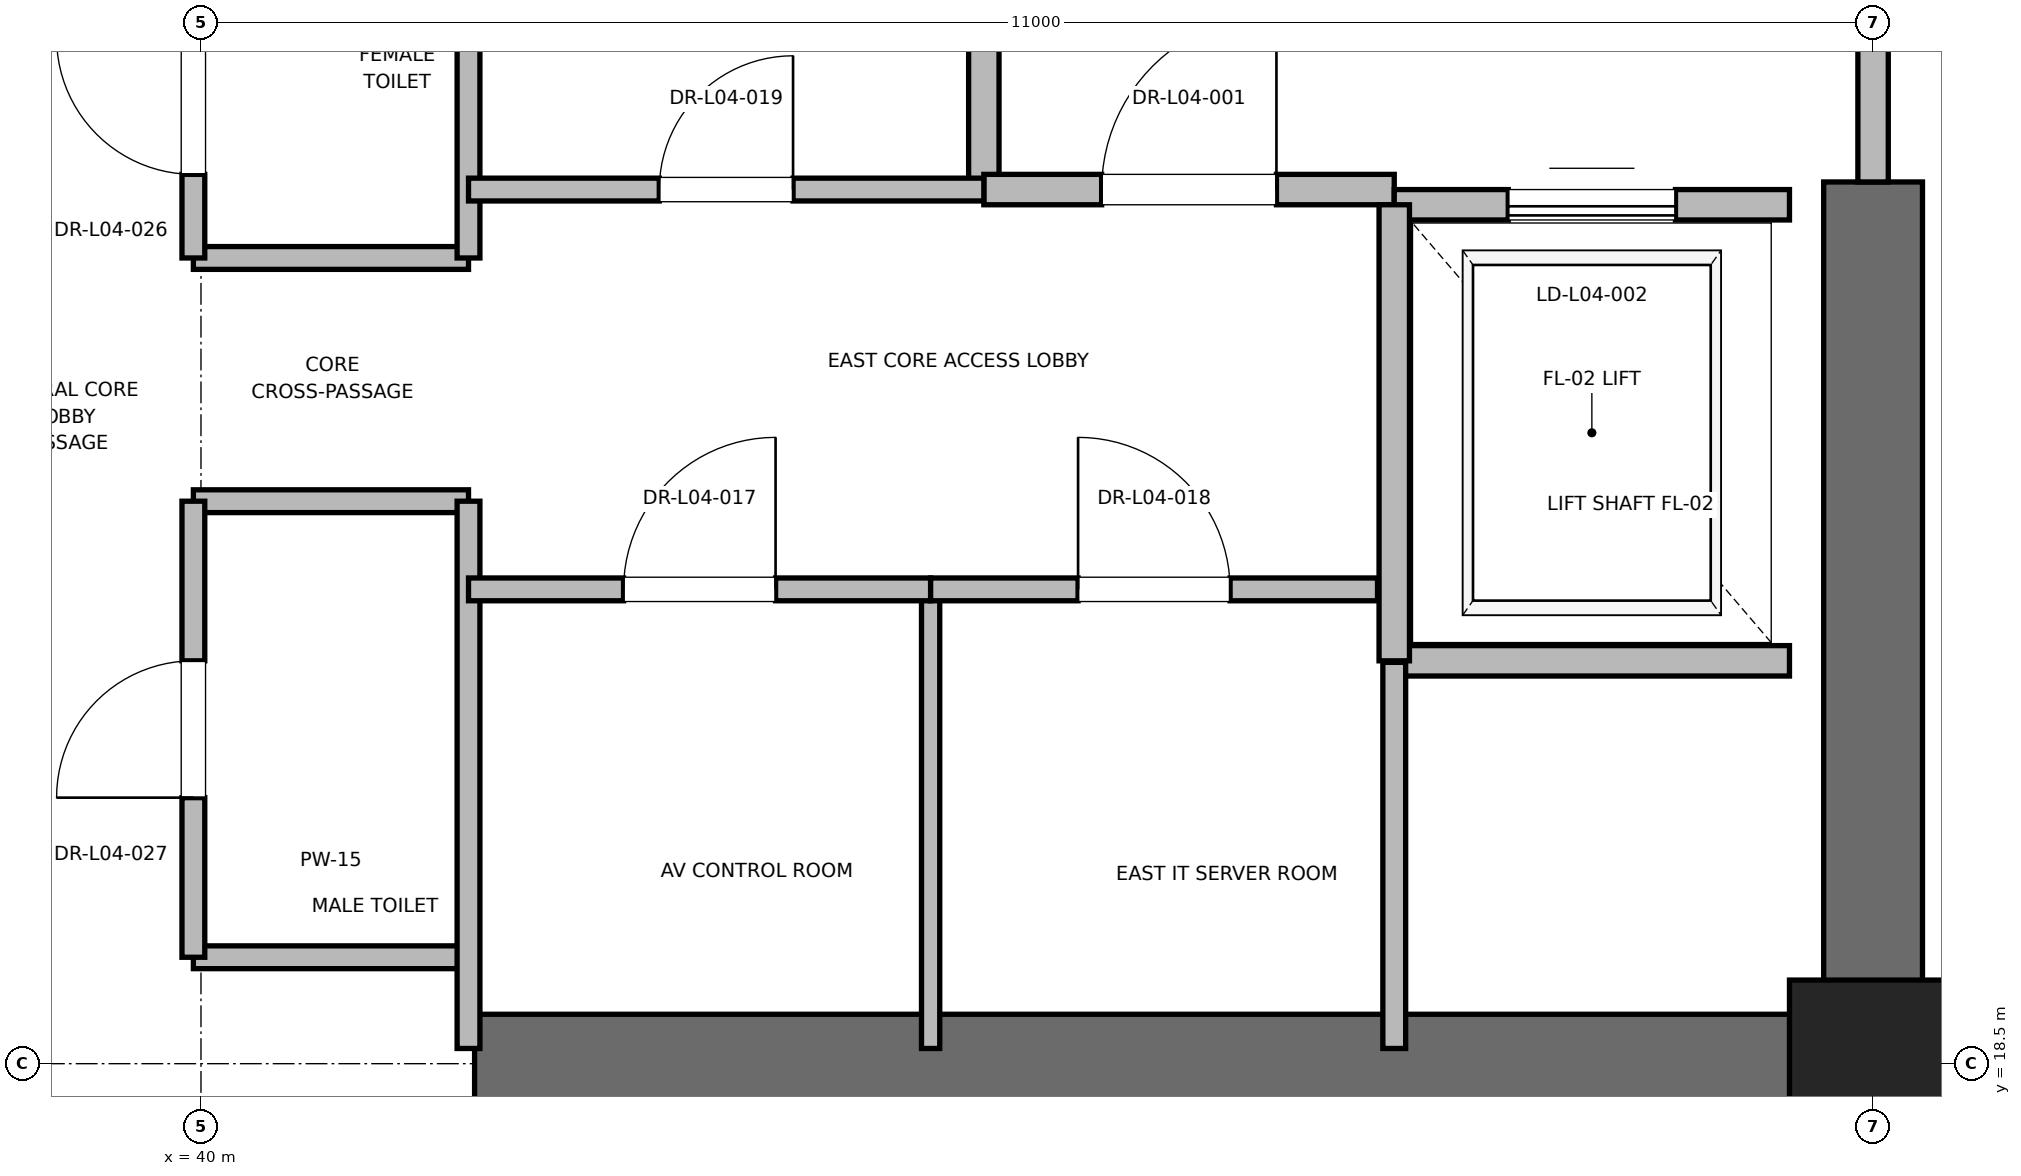
"""IFC4 building model, lengths in metres.
Left out: names, types, materials, properties, quantities, classifications, styles, units other than length and angle.
Written with IfcOpenShell. Run it as: python <this file> out.ifc"""

import sys

from ifc_helpers import new_model, si_unit, direction, frame, frame_2d, origin, origin_2d, place, context, subcontext, project, spatial, rectangle, extrude, element, fill, save


model = new_model("IFC4")
c1 = context("Model", 3, precision=1e-05, world=origin(), true_north=direction((0.0, 1.0)))
c2 = subcontext(c1, "Body", "Model", "MODEL_VIEW")
j1 = project(units=[si_unit("LENGTHUNIT", "METRE"), si_unit("PLANEANGLEUNIT", "RADIAN")], contexts=[c1])
p1 = place(None, origin())
s1 = spatial("IfcSite", under=j1, at=p1, CompositionType="ELEMENT")
p2 = place(p1, origin())
s2 = spatial("IfcBuilding", under=s1, at=p2, CompositionType="ELEMENT")
p3 = place(p2, frame((0.0, 0.0, 21.6)))
s3 = spatial("IfcBuildingStorey", under=s2, at=p3, CompositionType="ELEMENT", Elevation=21.6)
p4 = place(p3, frame((51.0, 18.5, 0.0), z_axis=(0.0, 0.0, 1.0), x_axis=(1.0, 0.0, 0.0)))
e1 = element("IfcColumn", 1, at=p4, inside=s3, PredefinedType="PILASTER", context=c2, shape_type="SweptSolid", body=[
    extrude(rectangle(XDim=1.1, YDim=1.1, at=origin_2d()), origin(), (0.0, 0.0, 1.0), 6.0),
])
p5 = place(p3, frame((41.8, 18.5, 0.0), z_axis=(0.0, 0.0, 1.0), x_axis=(1.0, 0.0, 0.0)))
e2 = element("IfcWall", 2, at=p5, inside=s3, PredefinedType="SHEAR", context=c2, shape_type="SweptSolid", body=[
    extrude(rectangle(XDim=9.2, YDim=0.65, at=frame_2d((4.6, 0.0))), origin(), (0.0, 0.0, 1.0), 5.76),
])
p6 = place(p3, frame((51.0, 18.5, 0.0), z_axis=(0.0, 0.0, 1.0), x_axis=(0.0, 1.0, 0.0)))
e3 = element("IfcWall", 3, at=p6, inside=s3, PredefinedType="SHEAR", context=c2, shape_type="SweptSolid", body=[
    extrude(rectangle(XDim=5.8, YDim=0.65, at=frame_2d((2.9, 0.0))), origin(), (0.0, 0.0, 1.0), 5.76),
])
p7 = place(p3, frame((45.15, 24.25, 0.0), z_axis=(0.0, 0.0, 1.0), x_axis=(0.0, 1.0, 0.0)))
e4 = element("IfcWall", 4, at=p7, inside=s3, PredefinedType="PARTITIONING", context=c2, shape_type="SweptSolid", body=[
    extrude(rectangle(XDim=3.37, YDim=0.2, at=frame_2d((1.685, 0.0))), origin(), (0.0, 0.0, 1.0), 5.76),
])
p8 = place(p3, frame((45.15, 24.25, 0.0), z_axis=(0.0, 0.0, 1.0), x_axis=(1.0, 0.0, 0.0)))
e5 = element("IfcWall", 5, at=p8, inside=s3, PredefinedType="PARTITIONING", context=c2, shape_type="SweptSolid", body=[
    extrude(rectangle(XDim=2.7, YDim=0.2, at=frame_2d((1.35, 0.0))), origin(), (0.0, 0.0, 1.0), 5.76),
])
p9 = place(p8, frame((0.775, 0.0, 0.0)))
e6 = element("IfcOpeningElement", 6, at=p9, cuts=e5, PredefinedType="OPENING", context=c2, shape_type="SweptSolid", body=[
    extrude(rectangle(XDim=1.15, YDim=2.2, at=frame_2d((0.575, 1.1))), frame((0.0, 0.1, 0.0), z_axis=(0.0, -1.0, 0.0), x_axis=(1.0, 0.0, 0.0)), (0.0, 0.0, 1.0), 0.2),
])
p10 = place(p3, frame((51.0, 24.3, 0.0), z_axis=(0.0, 0.0, 1.0), x_axis=(0.0, 1.0, 0.0)))
e7 = element("IfcWall", 7, at=p10, inside=s3, PredefinedType="PARTITIONING", context=c2, shape_type="SweptSolid", body=[
    extrude(rectangle(XDim=3.4, YDim=0.2, at=frame_2d((1.7, 0.0))), origin(), (0.0, 0.0, 1.0), 4.54),
])
p11 = place(p10, frame((1.125, 0.0, 0.0)))
e8 = element("IfcOpeningElement", 8, at=p11, cuts=e7, PredefinedType="OPENING", context=c2, shape_type="SweptSolid", body=[
    extrude(rectangle(XDim=1.15, YDim=2.2, at=frame_2d((0.575, 1.1))), frame((0.0, 0.1, 0.0), z_axis=(0.0, -1.0, 0.0), x_axis=(1.0, 0.0, 0.0)), (0.0, 0.0, 1.0), 0.2),
])
p12 = place(p3, frame((47.85, 21.15, 0.0), z_axis=(0.0, 0.0, 1.0), x_axis=(1.0, 0.0, 0.0)))
e9 = element("IfcWall", 9, at=p12, inside=s3, PredefinedType="SOLIDWALL", context=c2, shape_type="SweptSolid", body=[
    extrude(rectangle(XDim=2.6, YDim=0.2, at=frame_2d((1.3, 0.0))), origin(), (0.0, 0.0, 1.0), 5.76),
])
p13 = place(p3, frame((50.45, 24.15, 0.0), z_axis=(0.0, 0.0, 1.0), x_axis=(-1.0, 0.0, 0.0)))
e10 = element("IfcWall", 10, at=p13, inside=s3, PredefinedType="SOLIDWALL", context=c2, shape_type="SweptSolid", body=[
    extrude(rectangle(XDim=2.6, YDim=0.2, at=frame_2d((1.3, 0.0))), origin(), (0.0, 0.0, 1.0), 4.54),
])
p14 = place(p13, frame((0.75, 0.0, 0.0)))
e11 = element("IfcOpeningElement", 11, at=p14, cuts=e10, PredefinedType="OPENING", context=c2, shape_type="SweptSolid", body=[
    extrude(rectangle(XDim=1.1, YDim=2.2, at=frame_2d((0.55, 1.1))), frame((0.0, 0.1, 0.0), z_axis=(0.0, -1.0, 0.0), x_axis=(1.0, 0.0, 0.0)), (0.0, 0.0, 1.0), 0.2),
])
p15 = place(p3, frame((47.85, 24.15, 0.0), z_axis=(0.0, 0.0, 1.0), x_axis=(0.0, -1.0, 0.0)))
e12 = element("IfcWall", 12, at=p15, inside=s3, PredefinedType="SOLIDWALL", context=c2, shape_type="SweptSolid", body=[
    extrude(rectangle(XDim=3.0, YDim=0.2, at=frame_2d((1.5, 0.0))), origin(), (0.0, 0.0, 1.0), 5.76),
])
for number, where, z_axis, x_axis in (
    (13, (39.95, 19.2, 0.0), (0.0, 0.0, 1.0), (1.0, 0.0, 0.0)),
    (14, (39.95, 22.2, 0.0), (0.0, 0.0, 1.0), (1.0, 0.0, 0.0)),
    (15, (39.95, 23.8, 0.0), (0.0, 0.0, 1.0), (1.0, 0.0, 0.0)),
):
    element("IfcWall", number, at=place(p3, frame(where, z_axis=z_axis, x_axis=x_axis)), inside=s3, PredefinedType="PARTITIONING", context=c2, shape_type="SweptSolid", body=[
        extrude(rectangle(XDim=1.81, YDim=0.15, at=frame_2d((0.905, 0.0))), origin(), (0.0, 0.0, 1.0), 2.85),
    ])
p16 = place(p3, frame((41.76, 18.6, 0.0), z_axis=(0.0, 0.0, 1.0), x_axis=(0.0, 1.0, 0.0)))
e16 = element("IfcWall", 16, at=p16, inside=s3, PredefinedType="PARTITIONING", context=c2, shape_type="SweptSolid", body=[
    extrude(rectangle(XDim=3.6, YDim=0.15, at=frame_2d((1.8, 0.0))), origin(), (0.0, 0.0, 1.0), 2.85),
])
p17 = place(p3, frame((41.76, 23.8, 0.0), z_axis=(0.0, 0.0, 1.0), x_axis=(0.0, 1.0, 0.0)))
e17 = element("IfcWall", 17, at=p17, inside=s3, PredefinedType="PARTITIONING", context=c2, shape_type="SweptSolid", body=[
    extrude(rectangle(XDim=4.0, YDim=0.15, at=frame_2d((2.0, 0.0))), origin(), (0.0, 0.0, 1.0), 2.85),
])
p18 = place(p3, frame((39.95, 19.2, 0.0), z_axis=(0.0, 0.0, 1.0), x_axis=(0.0, 1.0, 0.0)))
e18 = element("IfcWall", 18, at=p18, inside=s3, PredefinedType="PARTITIONING", context=c2, shape_type="SweptSolid", body=[
    extrude(rectangle(XDim=3.0, YDim=0.15, at=frame_2d((1.5, 0.0))), origin(), (0.0, 0.0, 1.0), 2.85),
])
p19 = place(p18, frame((1.05, 0.0, 0.0)))
e19 = element("IfcOpeningElement", 19, at=p19, cuts=e18, PredefinedType="OPENING", context=c2, shape_type="SweptSolid", body=[
    extrude(rectangle(XDim=0.9, YDim=2.1, at=frame_2d((0.45, 1.05))), frame((0.0, 0.075, 0.0), z_axis=(0.0, -1.0, 0.0), x_axis=(1.0, 0.0, 0.0)), (0.0, 0.0, 1.0), 0.15),
])
p20 = place(p3, frame((39.95, 23.8, 0.0), z_axis=(0.0, 0.0, 1.0), x_axis=(0.0, 1.0, 0.0)))
e20 = element("IfcWall", 20, at=p20, inside=s3, PredefinedType="PARTITIONING", context=c2, shape_type="SweptSolid", body=[
    extrude(rectangle(XDim=2.0, YDim=0.15, at=frame_2d((1.0, 0.0))), origin(), (0.0, 0.0, 1.0), 2.85),
])
p21 = place(p20, frame((0.55, 0.0, 0.0)))
e21 = element("IfcOpeningElement", 21, at=p21, cuts=e20, PredefinedType="OPENING", context=c2, shape_type="SweptSolid", body=[
    extrude(rectangle(XDim=0.9, YDim=2.1, at=frame_2d((0.45, 1.05))), frame((0.0, 0.075, 0.0), z_axis=(0.0, -1.0, 0.0), x_axis=(1.0, 0.0, 0.0)), (0.0, 0.0, 1.0), 0.15),
])
p22 = place(p3, frame((47.85, 18.6, 0.0), z_axis=(0.0, 0.0, 1.0), x_axis=(0.0, 1.0, 0.0)))
e22 = element("IfcWall", 22, at=p22, inside=s3, PredefinedType="PARTITIONING", context=c2, shape_type="SweptSolid", body=[
    extrude(rectangle(XDim=2.54, YDim=0.15, at=frame_2d((1.27, 0.0))), origin(), (0.0, 0.0, 1.0), 2.85),
])
p23 = place(p3, frame((44.8, 18.6, 0.0), z_axis=(0.0, 0.0, 1.0), x_axis=(0.0, 1.0, 0.0)))
e23 = element("IfcWall", 23, at=p23, inside=s3, PredefinedType="PARTITIONING", context=c2, shape_type="SweptSolid", body=[
    extrude(rectangle(XDim=3.02, YDim=0.12, at=frame_2d((1.51, 0.0))), origin(), (0.0, 0.0, 1.0), 2.85),
])
p24 = place(p3, frame((41.76, 21.62, 0.0), z_axis=(0.0, 0.0, 1.0), x_axis=(1.0, 0.0, 0.0)))
e24 = element("IfcWall", 24, at=p24, inside=s3, PredefinedType="PARTITIONING", context=c2, shape_type="SweptSolid", body=[
    extrude(rectangle(XDim=3.04, YDim=0.15, at=frame_2d((1.52, 0.0))), origin(), (0.0, 0.0, 1.0), 2.85),
])
p25 = place(p24, frame((1.02, 0.0, 0.0)))
e25 = element("IfcOpeningElement", 25, at=p25, cuts=e24, PredefinedType="OPENING", context=c2, shape_type="SweptSolid", body=[
    extrude(rectangle(XDim=1.0, YDim=2.15, at=frame_2d((0.5, 1.075))), frame((0.0, 0.075, 0.0), z_axis=(0.0, -1.0, 0.0), x_axis=(1.0, 0.0, 0.0)), (0.0, 0.0, 1.0), 0.15),
])
p26 = place(p3, frame((44.8, 21.62, 0.0), z_axis=(0.0, 0.0, 1.0), x_axis=(1.0, 0.0, 0.0)))
e26 = element("IfcWall", 26, at=p26, inside=s3, PredefinedType="PARTITIONING", context=c2, shape_type="SweptSolid", body=[
    extrude(rectangle(XDim=2.94, YDim=0.15, at=frame_2d((1.47, 0.0))), origin(), (0.0, 0.0, 1.0), 2.85),
])
p27 = place(p26, frame((0.97, 0.0, 0.0)))
e27 = element("IfcOpeningElement", 27, at=p27, cuts=e26, PredefinedType="OPENING", context=c2, shape_type="SweptSolid", body=[
    extrude(rectangle(XDim=1.0, YDim=2.15, at=frame_2d((0.5, 1.075))), frame((0.0, 0.075, 0.0), z_axis=(0.0, -1.0, 0.0), x_axis=(1.0, 0.0, 0.0)), (0.0, 0.0, 1.0), 0.15),
])
p28 = place(p3, frame((41.76, 24.25, 0.0), z_axis=(0.0, 0.0, 1.0), x_axis=(1.0, 0.0, 0.0)))
e28 = element("IfcWall", 28, at=p28, inside=s3, PredefinedType="PARTITIONING", context=c2, shape_type="SweptSolid", body=[
    extrude(rectangle(XDim=3.39, YDim=0.15, at=frame_2d((1.695, 0.0))), origin(), (0.0, 0.0, 1.0), 2.85),
])
p29 = place(p28, frame((1.255, 0.0, 0.0)))
e29 = element("IfcOpeningElement", 29, at=p29, cuts=e28, PredefinedType="OPENING", context=c2, shape_type="SweptSolid", body=[
    extrude(rectangle(XDim=0.88, YDim=2.1, at=frame_2d((0.44, 1.05))), frame((0.0, 0.075, 0.0), z_axis=(0.0, -1.0, 0.0), x_axis=(1.0, 0.0, 0.0)), (0.0, 0.0, 1.0), 0.15),
])
p30 = place(p9, origin())
e30 = element("IfcDoor", 30, at=p30, inside=s3, OperationType="SINGLE_SWING_RIGHT", PredefinedType="DOOR", context=c2, shape_type="SweptSolid", body=[
    extrude(rectangle(XDim=1.15, YDim=2.2, at=frame_2d((0.575, 1.1))), frame((0.0, 0.025, 0.0), z_axis=(0.0, -1.0, 0.0), x_axis=(1.0, 0.0, 0.0)), (0.0, 0.0, 1.0), 0.05),
])
fill(e6, e30)
p31 = place(p14, origin())
e31 = element("IfcDoor", 31, at=p31, inside=s3, OperationType="SLIDING_TO_RIGHT", PredefinedType="DOOR", context=c2, shape_type="SweptSolid", body=[
    extrude(rectangle(XDim=1.1, YDim=2.2, at=frame_2d((0.55, 1.1))), frame((0.0, 0.025, 0.0), z_axis=(0.0, -1.0, 0.0), x_axis=(1.0, 0.0, 0.0)), (0.0, 0.0, 1.0), 0.05),
])
fill(e11, e31)
p32 = place(p19, origin())
e32 = element("IfcDoor", 32, at=p32, inside=s3, OperationType="SINGLE_SWING_LEFT", PredefinedType="DOOR", context=c2, shape_type="SweptSolid", body=[
    extrude(rectangle(XDim=0.9, YDim=2.1, at=frame_2d((0.45, 1.05))), frame((0.0, 0.025, 0.0), z_axis=(0.0, -1.0, 0.0), x_axis=(1.0, 0.0, 0.0)), (0.0, 0.0, 1.0), 0.05),
])
fill(e19, e32)
p33 = place(p21, origin())
e33 = element("IfcDoor", 33, at=p33, inside=s3, OperationType="SINGLE_SWING_RIGHT", PredefinedType="DOOR", context=c2, shape_type="SweptSolid", body=[
    extrude(rectangle(XDim=0.9, YDim=2.1, at=frame_2d((0.45, 1.05))), frame((0.0, 0.025, 0.0), z_axis=(0.0, -1.0, 0.0), x_axis=(1.0, 0.0, 0.0)), (0.0, 0.0, 1.0), 0.05),
])
fill(e21, e33)
p34 = place(p25, origin())
e34 = element("IfcDoor", 34, at=p34, inside=s3, OperationType="SINGLE_SWING_RIGHT", PredefinedType="DOOR", context=c2, shape_type="SweptSolid", body=[
    extrude(rectangle(XDim=1.0, YDim=2.15, at=frame_2d((0.5, 1.075))), frame((0.0, 0.025, 0.0), z_axis=(0.0, -1.0, 0.0), x_axis=(1.0, 0.0, 0.0)), (0.0, 0.0, 1.0), 0.05),
])
fill(e25, e34)
p35 = place(p27, origin())
e35 = element("IfcDoor", 35, at=p35, inside=s3, OperationType="SINGLE_SWING_LEFT", PredefinedType="DOOR", context=c2, shape_type="SweptSolid", body=[
    extrude(rectangle(XDim=1.0, YDim=2.15, at=frame_2d((0.5, 1.075))), frame((0.0, 0.025, 0.0), z_axis=(0.0, -1.0, 0.0), x_axis=(1.0, 0.0, 0.0)), (0.0, 0.0, 1.0), 0.05),
])
fill(e27, e35)
p36 = place(p29, origin())
e36 = element("IfcDoor", 36, at=p36, inside=s3, OperationType="SINGLE_SWING_RIGHT", PredefinedType="DOOR", context=c2, shape_type="SweptSolid", body=[
    extrude(rectangle(XDim=0.88, YDim=2.1, at=frame_2d((0.44, 1.05))), frame((0.0, 0.025, 0.0), z_axis=(0.0, -1.0, 0.0), x_axis=(1.0, 0.0, 0.0)), (0.0, 0.0, 1.0), 0.05),
])
fill(e29, e36)
save(model, sys.argv[1])
